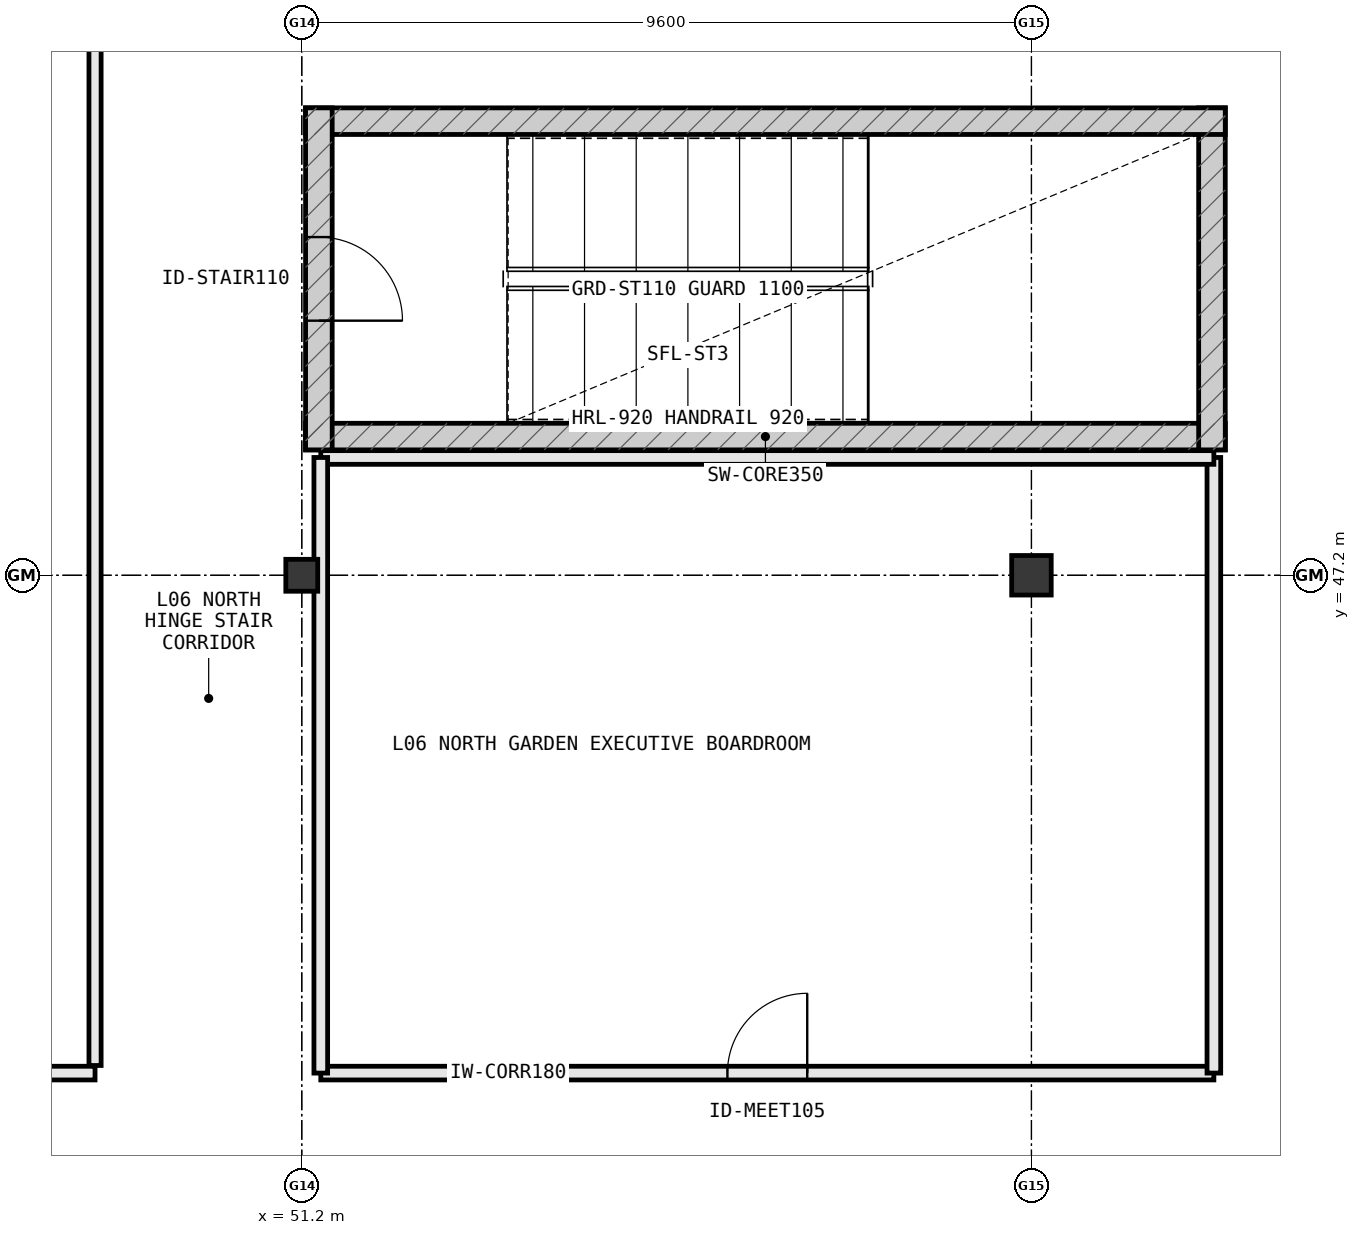
"""IFC4 building model, lengths in metres.
Left out: names, types, materials, properties, quantities, classifications, styles, units other than length and angle.
Written with IfcOpenShell. Run it as: python <this file> out.ifc"""

import sys

from ifc_helpers import new_model, si_unit, direction, frame, frame_2d, origin, origin_2d, place, context, subcontext, project, spatial, rectangle, extrude, element, fill, save


model = new_model("IFC4")
c1 = context("Model", 3, precision=1e-05, world=origin(), true_north=direction((0.0, 1.0)))
c2 = subcontext(c1, "Body", "Model", "MODEL_VIEW")
j1 = project(units=[si_unit("LENGTHUNIT", "METRE"), si_unit("PLANEANGLEUNIT", "RADIAN")], contexts=[c1])
p1 = place(None, origin())
s1 = spatial("IfcSite", under=j1, at=p1, CompositionType="ELEMENT")
p2 = place(p1, origin())
s2 = spatial("IfcBuilding", under=s1, at=p2, CompositionType="ELEMENT")
p3 = place(p2, frame((0.0, 0.0, 27.6)))
s3 = spatial("IfcBuildingStorey", under=s2, at=p3, CompositionType="ELEMENT", Elevation=27.6)
p4 = place(p3, frame((60.8, 47.2, 0.0), z_axis=(0.0, 0.0, 1.0), x_axis=(1.0, 0.0, 0.0)))
e1 = element("IfcColumn", 1, at=p4, inside=s3, PredefinedType="COLUMN", context=c2, shape_type="SweptSolid", body=[
    extrude(rectangle(XDim=0.52, YDim=0.52, at=origin_2d()), origin(), (0.0, 0.0, 1.0), 3.8),
])
p5 = place(p3, frame((51.2, 47.2, 0.0), z_axis=(0.0, 0.0, 1.0), x_axis=(1.0, 0.0, 0.0)))
e2 = element("IfcColumn", 2, at=p5, inside=s3, PredefinedType="COLUMN", context=c2, shape_type="SweptSolid", body=[
    extrude(rectangle(XDim=0.42, YDim=0.42, at=origin_2d()), origin(), (0.0, 0.0, 1.0), 3.8),
])
p6 = place(p3, frame((51.25, 49.025, 0.0), z_axis=(0.0, 0.0, 1.0), x_axis=(1.0, 0.0, 0.0)))
e3 = element("IfcWall", 3, at=p6, inside=s3, PredefinedType="SHEAR", context=c2, shape_type="SweptSolid", body=[
    extrude(rectangle(XDim=12.1, YDim=0.35, at=frame_2d((6.05, 0.0))), origin(), (0.0, 0.0, 1.0), 3.8),
])
p7 = place(p3, frame((63.175, 48.85, 0.0), z_axis=(0.0, 0.0, 1.0), x_axis=(0.0, 1.0, 0.0)))
e4 = element("IfcWall", 4, at=p7, inside=s3, PredefinedType="SHEAR", context=c2, shape_type="SweptSolid", body=[
    extrude(rectangle(XDim=4.5, YDim=0.35, at=frame_2d((2.25, 0.0))), origin(), (0.0, 0.0, 1.0), 3.8),
])
p8 = place(p3, frame((63.35, 53.175, 0.0), z_axis=(0.0, 0.0, 1.0), x_axis=(-1.0, 0.0, 0.0)))
e5 = element("IfcWall", 5, at=p8, inside=s3, PredefinedType="SHEAR", context=c2, shape_type="SweptSolid", body=[
    extrude(rectangle(XDim=12.1, YDim=0.35, at=frame_2d((6.05, 0.0))), origin(), (0.0, 0.0, 1.0), 3.8),
])
p9 = place(p3, frame((51.425, 53.35, 0.0), z_axis=(0.0, 0.0, 1.0), x_axis=(0.0, -1.0, 0.0)))
e6 = element("IfcWall", 6, at=p9, inside=s3, PredefinedType="SHEAR", context=c2, shape_type="SweptSolid", body=[
    extrude(rectangle(XDim=4.5, YDim=0.35, at=frame_2d((2.25, 0.0))), origin(), (0.0, 0.0, 1.0), 3.8),
])
p10 = place(p9, frame((1.7, 0.0, 0.0)))
e7 = element("IfcOpeningElement", 7, at=p10, cuts=e6, PredefinedType="OPENING", context=c2, shape_type="SweptSolid", body=[
    extrude(rectangle(XDim=1.1, YDim=2.2, at=frame_2d((0.55, 1.1))), frame((0.0, 0.187, 0.0), z_axis=(0.0, -1.0, 0.0), x_axis=(1.0, 0.0, 0.0)), (0.0, 0.0, 1.0), 0.374),
])
p11 = place(p3, frame((51.45, 40.65, 0.0), z_axis=(0.0, 0.0, 1.0), x_axis=(1.0, 0.0, 0.0)))
e8 = element("IfcWall", 8, at=p11, inside=s3, PredefinedType="PARTITIONING", context=c2, shape_type="SweptSolid", body=[
    extrude(rectangle(XDim=11.75, YDim=0.18, at=frame_2d((5.875, 0.0))), origin(), (0.0, 0.0, 1.0), 3.555),
])
p12 = place(p11, frame((5.35, 0.0, 0.0)))
e9 = element("IfcOpeningElement", 9, at=p12, cuts=e8, PredefinedType="OPENING", context=c2, shape_type="SweptSolid", body=[
    extrude(rectangle(XDim=1.05, YDim=2.2, at=frame_2d((0.525, 1.1))), frame((0.0, 0.102, 0.0), z_axis=(0.0, -1.0, 0.0), x_axis=(1.0, 0.0, 0.0)), (0.0, 0.0, 1.0), 0.204),
])
p13 = place(p3, frame((63.2, 40.65, 0.0), z_axis=(0.0, 0.0, 1.0), x_axis=(0.0, 1.0, 0.0)))
e10 = element("IfcWall", 10, at=p13, inside=s3, PredefinedType="PARTITIONING", context=c2, shape_type="SweptSolid", body=[
    extrude(rectangle(XDim=8.1, YDim=0.18, at=frame_2d((4.05, 0.0))), origin(), (0.0, 0.0, 1.0), 3.555),
])
p14 = place(p3, frame((63.2, 48.75, 0.0), z_axis=(0.0, 0.0, 1.0), x_axis=(-1.0, 0.0, 0.0)))
e11 = element("IfcWall", 11, at=p14, inside=s3, PredefinedType="PARTITIONING", context=c2, shape_type="SweptSolid", body=[
    extrude(rectangle(XDim=11.75, YDim=0.18, at=frame_2d((5.875, 0.0))), origin(), (0.0, 0.0, 1.0), 3.555),
])
p15 = place(p3, frame((51.45, 48.75, 0.0), z_axis=(0.0, 0.0, 1.0), x_axis=(0.0, -1.0, 0.0)))
e12 = element("IfcWall", 12, at=p15, inside=s3, PredefinedType="PARTITIONING", context=c2, shape_type="SweptSolid", body=[
    extrude(rectangle(XDim=8.1, YDim=0.18, at=frame_2d((4.05, 0.0))), origin(), (0.0, 0.0, 1.0), 2.91),
])
p16 = place(p3, frame((41.95, 40.65, 0.0), z_axis=(0.0, 0.0, 1.0), x_axis=(1.0, 0.0, 0.0)))
e13 = element("IfcWall", 13, at=p16, inside=s3, PredefinedType="PARTITIONING", context=c2, shape_type="SweptSolid", body=[
    extrude(rectangle(XDim=6.53, YDim=0.18, at=frame_2d((3.265, 0.0))), origin(), (0.0, 0.0, 1.0), 3.555),
])
p17 = place(p16, frame((3.745, 0.0, 0.0)))
e14 = element("IfcOpeningElement", 14, at=p17, cuts=e13, PredefinedType="OPENING", context=c2, shape_type="SweptSolid", body=[
    extrude(rectangle(XDim=1.0, YDim=2.2, at=frame_2d((0.5, 1.1))), frame((0.0, 0.102, 0.0), z_axis=(0.0, -1.0, 0.0), x_axis=(1.0, 0.0, 0.0)), (0.0, 0.0, 1.0), 0.204),
])
p18 = place(p3, frame((48.48, 40.75, 0.0), z_axis=(0.0, 0.0, 1.0), x_axis=(0.0, 1.0, 0.0)))
e15 = element("IfcWall", 15, at=p18, inside=s3, PredefinedType="PARTITIONING", context=c2, shape_type="SweptSolid", body=[
    extrude(rectangle(XDim=17.09, YDim=0.16, at=frame_2d((8.545, 0.0))), origin(), (0.0, 0.0, 1.0), 3.1),
])
p19 = place(p10, origin())
e16 = element("IfcDoor", 16, at=p19, inside=s3, OperationType="SINGLE_SWING_RIGHT", PredefinedType="DOOR", context=c2, shape_type="SweptSolid", body=[
    extrude(rectangle(XDim=1.1, YDim=2.2, at=frame_2d((0.55, 1.1))), frame((0.0, 0.025, 0.0), z_axis=(0.0, -1.0, 0.0), x_axis=(1.0, 0.0, 0.0)), (0.0, 0.0, 1.0), 0.05),
])
fill(e7, e16)
p20 = place(p12, origin())
e17 = element("IfcDoor", 17, at=p20, inside=s3, OperationType="SINGLE_SWING_RIGHT", PredefinedType="DOOR", context=c2, shape_type="SweptSolid", body=[
    extrude(rectangle(XDim=1.05, YDim=2.2, at=frame_2d((0.525, 1.1))), frame((0.0, 0.025, 0.0), z_axis=(0.0, -1.0, 0.0), x_axis=(1.0, 0.0, 0.0)), (0.0, 0.0, 1.0), 0.05),
])
fill(e9, e17)
save(model, sys.argv[1])
